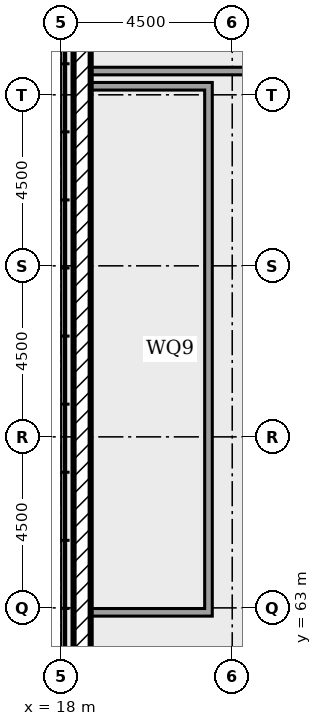
"""IFC4 building model, lengths in metres.
Left out: names, types, materials, properties, quantities, classifications, styles, units other than length and angle.
Written with IfcOpenShell. Run it as: python <this file> out.ifc"""

import sys

from ifc_helpers import new_model, si_unit, direction, frame, frame_2d, origin, place, context, subcontext, project, spatial, rectangle, extrude, element, save


model = new_model("IFC4")
c1 = context("Model", 3, precision=1e-05, world=origin(), true_north=direction((0.0, 1.0)))
c2 = subcontext(c1, "Body", "Model", "MODEL_VIEW")
j1 = project(units=[si_unit("LENGTHUNIT", "METRE"), si_unit("PLANEANGLEUNIT", "RADIAN")], contexts=[c1])
p1 = place(None, origin())
s1 = spatial("IfcSite", under=j1, at=p1, CompositionType="ELEMENT")
p2 = place(p1, origin())
s2 = spatial("IfcBuilding", under=s1, at=p2, CompositionType="ELEMENT")
p3 = place(p2, frame((0.0, 0.0, 16.5)))
s3 = spatial("IfcBuildingStorey", under=s2, at=p3, CompositionType="ELEMENT", Elevation=16.5)
p4 = place(p3, frame((18.55, 80.225, 0.0), z_axis=(0.0, 0.0, 1.0), x_axis=(0.0, -1.0, 0.0)))
e1 = element("IfcWall", 1, at=p4, inside=s3, PredefinedType="SOLIDWALL", context=c2, shape_type="SweptSolid", body=[
    extrude(rectangle(XDim=47.133, YDim=0.45, at=frame_2d((23.566, 0.0))), origin(), (0.0, 0.0, 1.0), 0.6),
])
p5 = place(p3, frame((18.775, 77.125, 0.0)))
e2 = element("IfcWall", 2, at=p5, inside=s3, PredefinedType="SOLIDWALL", context=c2, shape_type="SweptSolid", body=[
    extrude(rectangle(XDim=11.888, YDim=0.2, at=frame_2d((5.944, 0.0))), origin(), (0.0, 0.0, 1.0), 0.45),
])
p6 = place(p3, frame((21.875, 62.783, 0.0), z_axis=(0.0, 0.0, 1.0), x_axis=(0.0, 1.0, 0.0)))
e3 = element("IfcWall", 3, at=p6, inside=s3, PredefinedType="SOLIDWALL", context=c2, shape_type="SweptSolid", body=[
    extrude(rectangle(XDim=14.042, YDim=0.2, at=frame_2d((7.021, 0.0))), origin(), (0.0, 0.0, 1.0), 0.45),
])
for number, where in (
    (4, (18.775, 76.725, 0.0)),
    (5, (18.775, 62.883, 0.0)),
):
    element("IfcWall", number, at=place(p3, frame(where)), inside=s3, PredefinedType="SOLIDWALL", context=c2, shape_type="SweptSolid", body=[
        extrude(rectangle(XDim=3.0, YDim=0.2, at=frame_2d((1.5, 0.0))), origin(), (0.0, 0.0, 1.0), 0.45),
    ])
save(model, sys.argv[1])
